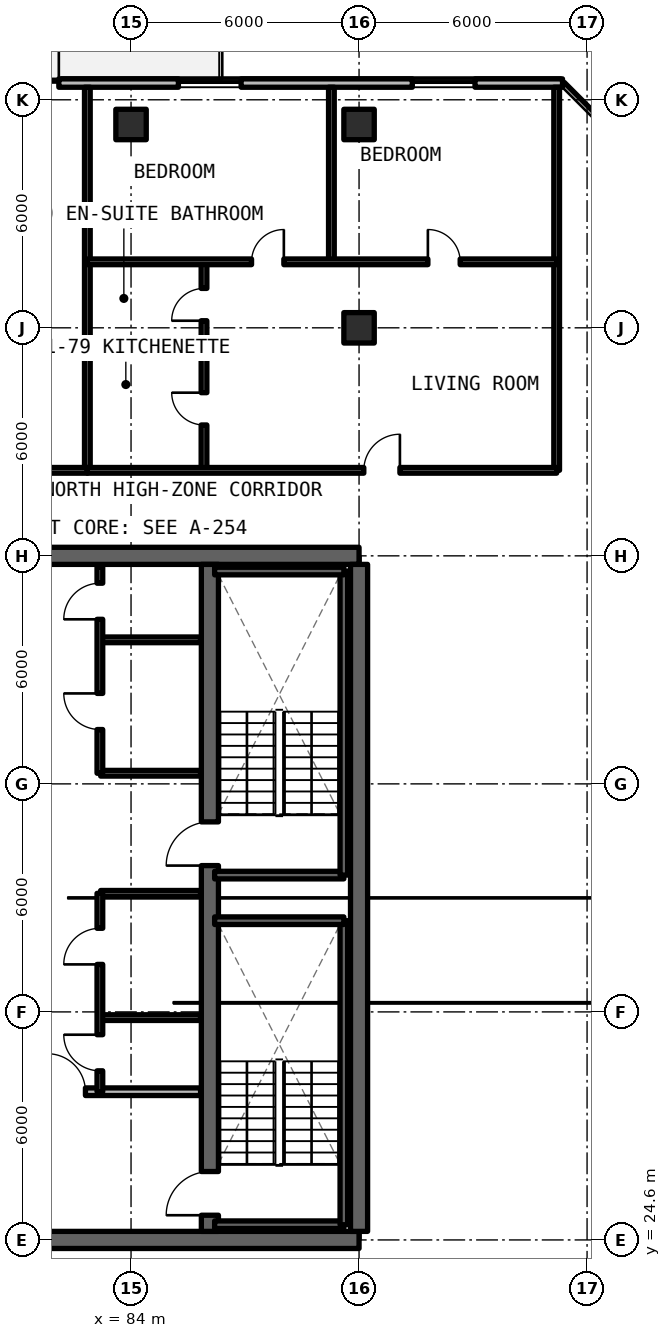
"""IFC4 building model, lengths in metres.
Left out: names, types, materials, properties, quantities, classifications, styles, units other than length and angle.
Written with IfcOpenShell. Run it as: python <this file> out.ifc"""

import sys

from ifc_helpers import new_model, si_unit, direction, frame, frame_2d, origin, origin_2d, place, context, subcontext, project, spatial, rectangle, extrude, element, fill, save


model = new_model("IFC4")
c1 = context("Model", 3, precision=1e-05, world=origin(), true_north=direction((0.0, 1.0)))
c2 = subcontext(c1, "Body", "Model", "MODEL_VIEW")
j1 = project(units=[si_unit("LENGTHUNIT", "METRE"), si_unit("PLANEANGLEUNIT", "RADIAN")], contexts=[c1])
p1 = place(None, origin())
s1 = spatial("IfcSite", under=j1, at=p1, CompositionType="ELEMENT")
p2 = place(p1, origin())
s2 = spatial("IfcBuilding", under=s1, at=p2, CompositionType="ELEMENT")
p3 = place(p2, frame((0.0, 0.0, 185.13)))
s3 = spatial("IfcBuildingStorey", under=s2, at=p3, CompositionType="ELEMENT", Elevation=185.13)
for number, where, z_axis, x_axis in (
    (1, (78.0, 24.6, 0.0), (0.0, 0.0, 1.0), (1.0, 0.0, 0.0)),
    (2, (90.0, 42.6, 0.0), (0.0, 0.0, 1.0), (-1.0, 0.0, 0.0)),
):
    element("IfcWall", number, at=place(p3, frame(where, z_axis=z_axis, x_axis=x_axis)), inside=s3, PredefinedType="SHEAR", context=c2, shape_type="SweptSolid", body=[
        extrude(rectangle(XDim=12.0, YDim=0.45, at=frame_2d((6.0, 0.0))), origin(), (0.0, 0.0, 1.0), 3.3),
    ])
p4 = place(p3, frame((90.0, 24.825, 0.0), z_axis=(0.0, 0.0, 1.0), x_axis=(0.0, 1.0, 0.0)))
e3 = element("IfcWall", 3, at=p4, inside=s3, PredefinedType="SHEAR", context=c2, shape_type="SweptSolid", body=[
    extrude(rectangle(XDim=17.55, YDim=0.45, at=frame_2d((8.775, 0.0))), origin(), (0.0, 0.0, 1.0), 3.3),
])
p5 = place(p3, frame((86.075, 24.825, 0.0), z_axis=(0.0, 0.0, 1.0), x_axis=(0.0, 1.0, 0.0)))
e4 = element("IfcWall", 4, at=p5, inside=s3, PredefinedType="SHEAR", context=c2, shape_type="SweptSolid", body=[
    extrude(rectangle(XDim=17.55, YDim=0.45, at=frame_2d((8.775, 0.0))), origin(), (0.0, 0.0, 1.0), 3.3),
])
p6 = place(p5, frame((0.425, 0.0, 0.0)))
e5 = element("IfcOpeningElement", 5, at=p6, cuts=e4, PredefinedType="OPENING", context=c2, shape_type="SweptSolid", body=[
    extrude(rectangle(XDim=1.15, YDim=2.15, at=frame_2d((0.575, 1.075))), frame((0.0, 0.235, 0.0), z_axis=(0.0, -1.0, 0.0), x_axis=(1.0, 0.0, 0.0)), (0.0, 0.0, 1.0), 0.47),
])
p7 = place(p5, frame((9.625, 0.0, 0.0)))
e6 = element("IfcOpeningElement", 6, at=p7, cuts=e4, PredefinedType="OPENING", context=c2, shape_type="SweptSolid", body=[
    extrude(rectangle(XDim=1.15, YDim=2.15, at=frame_2d((0.575, 1.075))), frame((0.0, 0.235, 0.0), z_axis=(0.0, -1.0, 0.0), x_axis=(1.0, 0.0, 0.0)), (0.0, 0.0, 1.0), 0.47),
])
for number, where, z_axis, x_axis in (
    (7, (90.0, 48.6, 0.0), (0.0, 0.0, 1.0), (1.0, 0.0, 0.0)),
    (8, (84.0, 53.95, 0.0), (0.0, 0.0, 1.0), (1.0, 0.0, 0.0)),
    (9, (90.0, 53.95, 0.0), (0.0, 0.0, 1.0), (1.0, 0.0, 0.0)),
):
    element("IfcColumn", number, at=place(p3, frame(where, z_axis=z_axis, x_axis=x_axis)), inside=s3, PredefinedType="COLUMN", context=c2, shape_type="SweptSolid", body=[
        extrude(rectangle(XDim=0.8, YDim=0.8, at=origin_2d()), origin(), (0.0, 0.0, 1.0), 3.3),
    ])
p8 = place(p3, frame((95.354, 55.04, 0.0), z_axis=(0.0, 0.0, 1.0), x_axis=(-1.0, 0.0, 0.0)))
e10 = element("IfcWall", 10, at=p8, inside=s3, PredefinedType="SOLIDWALL", context=c2, shape_type="SweptSolid", body=[
    extrude(rectangle(XDim=43.244, YDim=0.22, at=frame_2d((21.622, 0.0))), origin(), (0.0, 0.0, 1.0), 3.08),
])
p9 = place(p8, frame((37.204, 0.0, 0.0)))
e11 = element("IfcOpeningElement", 11, at=p9, cuts=e10, PredefinedType="OPENING", context=c2, shape_type="SweptSolid", body=[
    extrude(rectangle(XDim=1.1, YDim=2.15, at=frame_2d((0.55, 1.075))), frame((0.0, 0.12, 0.0), z_axis=(0.0, -1.0, 0.0), x_axis=(1.0, 0.0, 0.0)), (0.0, 0.0, 1.0), 0.24),
])
p10 = place(p8, frame((25.104, 0.0, 0.0)))
e12 = element("IfcOpeningElement", 12, at=p10, cuts=e10, PredefinedType="OPENING", context=c2, shape_type="SweptSolid", body=[
    extrude(rectangle(XDim=1.1, YDim=2.15, at=frame_2d((0.55, 1.075))), frame((0.0, 0.12, 0.0), z_axis=(0.0, -1.0, 0.0), x_axis=(1.0, 0.0, 0.0)), (0.0, 0.0, 1.0), 0.24),
])
p11 = place(p8, frame((13.254, 0.0, 0.0)))
e13 = element("IfcOpeningElement", 13, at=p11, cuts=e10, PredefinedType="OPENING", context=c2, shape_type="SweptSolid", body=[
    extrude(rectangle(XDim=1.1, YDim=2.15, at=frame_2d((0.55, 1.075))), frame((0.0, 0.12, 0.0), z_axis=(0.0, -1.0, 0.0), x_axis=(1.0, 0.0, 0.0)), (0.0, 0.0, 1.0), 0.24),
])
p12 = place(p8, frame((32.815, 0.0, 0.78)))
e14 = element("IfcOpeningElement", 14, at=p12, cuts=e10, PredefinedType="OPENING", context=c2, shape_type="SweptSolid", body=[
    extrude(rectangle(XDim=1.65, YDim=1.66, at=frame_2d((0.825, 0.83))), frame((0.0, 0.12, 0.0), z_axis=(0.0, -1.0, 0.0), x_axis=(1.0, 0.0, 0.0)), (0.0, 0.0, 1.0), 0.24),
])
p13 = place(p8, frame((8.458, 0.0, 0.78)))
e15 = element("IfcOpeningElement", 15, at=p13, cuts=e10, PredefinedType="OPENING", context=c2, shape_type="SweptSolid", body=[
    extrude(rectangle(XDim=1.65, YDim=1.66, at=frame_2d((0.825, 0.83))), frame((0.0, 0.12, 0.0), z_axis=(0.0, -1.0, 0.0), x_axis=(1.0, 0.0, 0.0)), (0.0, 0.0, 1.0), 0.24),
])
p14 = place(p8, frame((2.303, 0.0, 0.78)))
e16 = element("IfcOpeningElement", 16, at=p14, cuts=e10, PredefinedType="OPENING", context=c2, shape_type="SweptSolid", body=[
    extrude(rectangle(XDim=1.65, YDim=1.66, at=frame_2d((0.825, 0.83))), frame((0.0, 0.12, 0.0), z_axis=(0.0, -1.0, 0.0), x_axis=(1.0, 0.0, 0.0)), (0.0, 0.0, 1.0), 0.24),
])
p15 = place(p3, frame((78.245, 28.5, 0.0), z_axis=(0.0, 0.0, 1.0), x_axis=(1.0, 0.0, 0.0)))
e17 = element("IfcWall", 17, at=p15, inside=s3, PredefinedType="SOLIDWALL", context=c2, shape_type="SweptSolid", body=[
    extrude(rectangle(XDim=7.585, YDim=0.2, at=frame_2d((3.792, 0.0))), origin(), (0.0, 0.0, 1.0), 2.35),
])
p16 = place(p15, frame((3.555, 0.0, 0.0)))
e18 = element("IfcOpeningElement", 18, at=p16, cuts=e17, PredefinedType="OPENING", context=c2, shape_type="SweptSolid", body=[
    extrude(rectangle(XDim=1.0, YDim=2.15, at=frame_2d((0.5, 1.075))), frame((0.0, 0.11, 0.0), z_axis=(0.0, -1.0, 0.0), x_axis=(1.0, 0.0, 0.0)), (0.0, 0.0, 1.0), 0.22),
])
for number, where, z_axis, x_axis in (
    (19, (83.2, 30.45, 0.0), (0.0, 0.0, 1.0), (1.0, 0.0, 0.0)),
    (20, (83.2, 33.72, 0.0), (0.0, 0.0, 1.0), (1.0, 0.0, 0.0)),
):
    element("IfcWall", number, at=place(p3, frame(where, z_axis=z_axis, x_axis=x_axis)), inside=s3, PredefinedType="SOLIDWALL", context=c2, shape_type="SweptSolid", body=[
        extrude(rectangle(XDim=2.63, YDim=0.15, at=frame_2d((1.315, 0.0))), origin(), (0.0, 0.0, 1.0), 2.35),
    ])
p17 = place(p3, frame((83.18, 28.5, 0.0), z_axis=(0.0, 0.0, 1.0), x_axis=(0.0, 1.0, 0.0)))
e21 = element("IfcWall", 21, at=p17, inside=s3, PredefinedType="SOLIDWALL", context=c2, shape_type="SweptSolid", body=[
    extrude(rectangle(XDim=5.22, YDim=0.15, at=frame_2d((2.61, 0.0))), origin(), (0.0, 0.0, 1.0), 2.35),
])
p18 = place(p17, frame((0.55, 0.0, 0.0)))
e22 = element("IfcOpeningElement", 22, at=p18, cuts=e21, PredefinedType="OPENING", context=c2, shape_type="SweptSolid", body=[
    extrude(rectangle(XDim=0.95, YDim=2.15, at=frame_2d((0.475, 1.075))), frame((0.0, 0.085, 0.0), z_axis=(0.0, -1.0, 0.0), x_axis=(1.0, 0.0, 0.0)), (0.0, 0.0, 1.0), 0.17),
])
p19 = place(p17, frame((3.35, 0.0, 0.0)))
e23 = element("IfcOpeningElement", 23, at=p19, cuts=e21, PredefinedType="OPENING", context=c2, shape_type="SweptSolid", body=[
    extrude(rectangle(XDim=0.95, YDim=2.15, at=frame_2d((0.475, 1.075))), frame((0.0, 0.085, 0.0), z_axis=(0.0, -1.0, 0.0), x_axis=(1.0, 0.0, 0.0)), (0.0, 0.0, 1.0), 0.17),
])
for number, where, z_axis, x_axis in (
    (24, (83.2, 36.88, 0.0), (0.0, 0.0, 1.0), (1.0, 0.0, 0.0)),
    (25, (83.2, 40.39, 0.0), (0.0, 0.0, 1.0), (1.0, 0.0, 0.0)),
):
    element("IfcWall", number, at=place(p3, frame(where, z_axis=z_axis, x_axis=x_axis)), inside=s3, PredefinedType="SOLIDWALL", context=c2, shape_type="SweptSolid", body=[
        extrude(rectangle(XDim=2.63, YDim=0.15, at=frame_2d((1.315, 0.0))), origin(), (0.0, 0.0, 1.0), 2.35),
    ])
p20 = place(p3, frame((83.18, 36.88, 0.0), z_axis=(0.0, 0.0, 1.0), x_axis=(0.0, 1.0, 0.0)))
e26 = element("IfcWall", 26, at=p20, inside=s3, PredefinedType="SOLIDWALL", context=c2, shape_type="SweptSolid", body=[
    extrude(rectangle(XDim=5.42, YDim=0.15, at=frame_2d((2.71, 0.0))), origin(), (0.0, 0.0, 1.0), 2.35),
])
p21 = place(p20, frame((1.15, 0.0, 0.0)))
e27 = element("IfcOpeningElement", 27, at=p21, cuts=e26, PredefinedType="OPENING", context=c2, shape_type="SweptSolid", body=[
    extrude(rectangle(XDim=0.95, YDim=2.15, at=frame_2d((0.475, 1.075))), frame((0.0, 0.085, 0.0), z_axis=(0.0, -1.0, 0.0), x_axis=(1.0, 0.0, 0.0)), (0.0, 0.0, 1.0), 0.17),
])
p22 = place(p20, frame((4.05, 0.0, 0.0)))
e28 = element("IfcOpeningElement", 28, at=p22, cuts=e26, PredefinedType="OPENING", context=c2, shape_type="SweptSolid", body=[
    extrude(rectangle(XDim=0.95, YDim=2.15, at=frame_2d((0.475, 1.075))), frame((0.0, 0.085, 0.0), z_axis=(0.0, -1.0, 0.0), x_axis=(1.0, 0.0, 0.0)), (0.0, 0.0, 1.0), 0.17),
])
for number, where, z_axis, x_axis in (
    (29, (95.2, 44.85, 0.0), (0.0, 0.0, 1.0), (0.0, 1.0, 0.0)),
    (30, (82.85, 44.85, 0.0), (0.0, 0.0, 1.0), (0.0, 1.0, 0.0)),
):
    element("IfcWall", number, at=place(p3, frame(where, z_axis=z_axis, x_axis=x_axis)), inside=s3, PredefinedType="SOLIDWALL", context=c2, shape_type="SweptSolid", body=[
        extrude(rectangle(XDim=10.08, YDim=0.15, at=frame_2d((5.04, 0.0))), origin(), (0.0, 0.0, 1.0), 2.35),
    ])
p23 = place(p3, frame((73.086, 44.85, 0.0), z_axis=(0.0, 0.0, 1.0), x_axis=(1.0, 0.0, 0.0)))
e31 = element("IfcWall", 31, at=p23, inside=s3, PredefinedType="SOLIDWALL", context=c2, shape_type="SweptSolid", body=[
    extrude(rectangle(XDim=9.765, YDim=0.15, at=frame_2d((4.882, 0.0))), origin(), (0.0, 0.0, 1.0), 2.35),
])
p24 = place(p23, frame((4.333, 0.0, 0.0)))
e32 = element("IfcOpeningElement", 32, at=p24, cuts=e31, PredefinedType="OPENING", context=c2, shape_type="SweptSolid", body=[
    extrude(rectangle(XDim=1.1, YDim=2.15, at=frame_2d((0.55, 1.075))), frame((0.0, 0.085, 0.0), z_axis=(0.0, -1.0, 0.0), x_axis=(1.0, 0.0, 0.0)), (0.0, 0.0, 1.0), 0.17),
])
p25 = place(p3, frame((82.85, 48.087, 0.0), z_axis=(0.0, 0.0, 1.0), x_axis=(1.0, 0.0, 0.0)))
e33 = element("IfcWall", 33, at=p25, inside=s3, PredefinedType="PARTITIONING", context=c2, shape_type="SweptSolid", body=[
    extrude(rectangle(XDim=3.07, YDim=0.15, at=frame_2d((1.535, 0.0))), origin(), (0.0, 0.0, 1.0), 2.35),
])
p26 = place(p3, frame((85.92, 44.85, 0.0), z_axis=(0.0, 0.0, 1.0), x_axis=(0.0, 1.0, 0.0)))
e34 = element("IfcWall", 34, at=p26, inside=s3, PredefinedType="PARTITIONING", context=c2, shape_type="SweptSolid", body=[
    extrude(rectangle(XDim=5.486, YDim=0.15, at=frame_2d((2.743, 0.0))), origin(), (0.0, 0.0, 1.0), 2.35),
])
p27 = place(p26, frame((1.193, 0.0, 0.0)))
e35 = element("IfcOpeningElement", 35, at=p27, cuts=e34, PredefinedType="OPENING", context=c2, shape_type="SweptSolid", body=[
    extrude(rectangle(XDim=0.85, YDim=2.1, at=frame_2d((0.425, 1.05))), frame((0.0, 0.085, 0.0), z_axis=(0.0, -1.0, 0.0), x_axis=(1.0, 0.0, 0.0)), (0.0, 0.0, 1.0), 0.17),
])
p28 = place(p26, frame((3.937, 0.0, 0.0)))
e36 = element("IfcOpeningElement", 36, at=p28, cuts=e34, PredefinedType="OPENING", context=c2, shape_type="SweptSolid", body=[
    extrude(rectangle(XDim=0.85, YDim=2.1, at=frame_2d((0.425, 1.05))), frame((0.0, 0.085, 0.0), z_axis=(0.0, -1.0, 0.0), x_axis=(1.0, 0.0, 0.0)), (0.0, 0.0, 1.0), 0.17),
])
p29 = place(p3, frame((89.272, 50.336, 0.0), z_axis=(0.0, 0.0, 1.0), x_axis=(0.0, 1.0, 0.0)))
e37 = element("IfcWall", 37, at=p29, inside=s3, PredefinedType="PARTITIONING", context=c2, shape_type="SweptSolid", body=[
    extrude(rectangle(XDim=4.594, YDim=0.15, at=frame_2d((2.297, 0.0))), origin(), (0.0, 0.0, 1.0), 2.35),
])
p30 = place(p3, frame((82.85, 50.336, 0.0), z_axis=(0.0, 0.0, 1.0), x_axis=(1.0, 0.0, 0.0)))
e38 = element("IfcWall", 38, at=p30, inside=s3, PredefinedType="PARTITIONING", context=c2, shape_type="SweptSolid", body=[
    extrude(rectangle(XDim=12.35, YDim=0.15, at=frame_2d((6.175, 0.0))), origin(), (0.0, 0.0, 1.0), 2.35),
])
p31 = place(p30, frame((4.321, 0.0, 0.0)))
e39 = element("IfcOpeningElement", 39, at=p31, cuts=e38, PredefinedType="OPENING", context=c2, shape_type="SweptSolid", body=[
    extrude(rectangle(XDim=0.85, YDim=2.1, at=frame_2d((0.425, 1.05))), frame((0.0, 0.085, 0.0), z_axis=(0.0, -1.0, 0.0), x_axis=(1.0, 0.0, 0.0)), (0.0, 0.0, 1.0), 0.17),
])
p32 = place(p30, frame((8.961, 0.0, 0.0)))
e40 = element("IfcOpeningElement", 40, at=p32, cuts=e38, PredefinedType="OPENING", context=c2, shape_type="SweptSolid", body=[
    extrude(rectangle(XDim=0.85, YDim=2.1, at=frame_2d((0.425, 1.05))), frame((0.0, 0.085, 0.0), z_axis=(0.0, -1.0, 0.0), x_axis=(1.0, 0.0, 0.0)), (0.0, 0.0, 1.0), 0.17),
])
p33 = place(p3, frame((82.85, 44.85, 0.0), z_axis=(0.0, 0.0, 1.0), x_axis=(1.0, 0.0, 0.0)))
e41 = element("IfcWall", 41, at=p33, inside=s3, PredefinedType="SOLIDWALL", context=c2, shape_type="SweptSolid", body=[
    extrude(rectangle(XDim=12.35, YDim=0.15, at=frame_2d((6.175, 0.0))), origin(), (0.0, 0.0, 1.0), 2.35),
])
p34 = place(p33, frame((7.275, 0.0, 0.0)))
e42 = element("IfcOpeningElement", 42, at=p34, cuts=e41, PredefinedType="OPENING", context=c2, shape_type="SweptSolid", body=[
    extrude(rectangle(XDim=0.95, YDim=2.15, at=frame_2d((0.475, 1.075))), frame((0.0, 0.085, 0.0), z_axis=(0.0, -1.0, 0.0), x_axis=(1.0, 0.0, 0.0)), (0.0, 0.0, 1.0), 0.17),
])
p35 = place(p3, frame((86.2, 25.0, 0.0), z_axis=(0.0, 0.0, 1.0), x_axis=(1.0, 0.0, 0.0)))
e43 = element("IfcWall", 43, at=p35, inside=s3, PredefinedType="SOLIDWALL", context=c2, shape_type="SweptSolid", body=[
    extrude(rectangle(XDim=3.4, YDim=0.2, at=frame_2d((1.7, 0.0))), origin(), (0.0, 0.0, 1.0), 3.3),
])
p36 = place(p3, frame((89.6, 25.0, 0.0), z_axis=(0.0, 0.0, 1.0), x_axis=(0.0, 1.0, 0.0)))
e44 = element("IfcWall", 44, at=p36, inside=s3, PredefinedType="SOLIDWALL", context=c2, shape_type="SweptSolid", body=[
    extrude(rectangle(XDim=8.0, YDim=0.2, at=frame_2d((4.0, 0.0))), origin(), (0.0, 0.0, 1.0), 3.3),
])
for number, where, z_axis, x_axis in (
    (45, (89.6, 33.0, 0.0), (0.0, 0.0, 1.0), (-1.0, 0.0, 0.0)),
    (46, (86.2, 34.2, 0.0), (0.0, 0.0, 1.0), (1.0, 0.0, 0.0)),
):
    element("IfcWall", number, at=place(p3, frame(where, z_axis=z_axis, x_axis=x_axis)), inside=s3, PredefinedType="SOLIDWALL", context=c2, shape_type="SweptSolid", body=[
        extrude(rectangle(XDim=3.4, YDim=0.2, at=frame_2d((1.7, 0.0))), origin(), (0.0, 0.0, 1.0), 3.3),
    ])
p37 = place(p3, frame((89.6, 34.2, 0.0), z_axis=(0.0, 0.0, 1.0), x_axis=(0.0, 1.0, 0.0)))
e47 = element("IfcWall", 47, at=p37, inside=s3, PredefinedType="SOLIDWALL", context=c2, shape_type="SweptSolid", body=[
    extrude(rectangle(XDim=8.0, YDim=0.2, at=frame_2d((4.0, 0.0))), origin(), (0.0, 0.0, 1.0), 3.3),
])
p38 = place(p3, frame((89.6, 42.2, 0.0), z_axis=(0.0, 0.0, 1.0), x_axis=(-1.0, 0.0, 0.0)))
e48 = element("IfcWall", 48, at=p38, inside=s3, PredefinedType="SOLIDWALL", context=c2, shape_type="SweptSolid", body=[
    extrude(rectangle(XDim=3.4, YDim=0.2, at=frame_2d((1.7, 0.0))), origin(), (0.0, 0.0, 1.0), 3.3),
])
p39 = place(p11, frame((1.1, 0.0, 0.0), z_axis=(0.0, 0.0, 1.0), x_axis=(-1.0, 0.0, 0.0)))
e49 = element("IfcDoor", 49, at=p39, inside=s3, OperationType="SINGLE_SWING_RIGHT", PredefinedType="DOOR", context=c2, shape_type="SweptSolid", body=[
    extrude(rectangle(XDim=1.1, YDim=2.15, at=frame_2d((0.55, 1.075))), frame((0.0, 0.025, 0.0), z_axis=(0.0, -1.0, 0.0), x_axis=(1.0, 0.0, 0.0)), (0.0, 0.0, 1.0), 0.05),
])
fill(e13, e49)
p40 = place(p13, origin())
e50 = element("IfcWindow", 50, at=p40, inside=s3, PartitioningType="SINGLE_PANEL", PredefinedType="WINDOW", context=c2, shape_type="SweptSolid", body=[
    extrude(rectangle(XDim=1.65, YDim=1.66, at=frame_2d((0.825, 0.83))), frame((0.0, 0.03, 0.0), z_axis=(0.0, -1.0, 0.0), x_axis=(1.0, 0.0, 0.0)), (0.0, 0.0, 1.0), 0.06),
])
fill(e15, e50)
p41 = place(p14, origin())
e51 = element("IfcWindow", 51, at=p41, inside=s3, PartitioningType="SINGLE_PANEL", PredefinedType="WINDOW", context=c2, shape_type="SweptSolid", body=[
    extrude(rectangle(XDim=1.65, YDim=1.66, at=frame_2d((0.825, 0.83))), frame((0.0, 0.03, 0.0), z_axis=(0.0, -1.0, 0.0), x_axis=(1.0, 0.0, 0.0)), (0.0, 0.0, 1.0), 0.06),
])
fill(e16, e51)
p42 = place(p16, origin())
e52 = element("IfcDoor", 52, at=p42, inside=s3, OperationType="SINGLE_SWING_LEFT", PredefinedType="DOOR", context=c2, shape_type="SweptSolid", body=[
    extrude(rectangle(XDim=1.0, YDim=2.15, at=frame_2d((0.5, 1.075))), frame((0.0, 0.025, 0.0), z_axis=(0.0, -1.0, 0.0), x_axis=(1.0, 0.0, 0.0)), (0.0, 0.0, 1.0), 0.05),
])
fill(e18, e52)
p43 = place(p18, origin())
e53 = element("IfcDoor", 53, at=p43, inside=s3, OperationType="SINGLE_SWING_RIGHT", PredefinedType="DOOR", context=c2, shape_type="SweptSolid", body=[
    extrude(rectangle(XDim=0.95, YDim=2.15, at=frame_2d((0.475, 1.075))), frame((0.0, 0.025, 0.0), z_axis=(0.0, -1.0, 0.0), x_axis=(1.0, 0.0, 0.0)), (0.0, 0.0, 1.0), 0.05),
])
fill(e22, e53)
p44 = place(p19, origin())
e54 = element("IfcDoor", 54, at=p44, inside=s3, OperationType="SINGLE_SWING_LEFT", PredefinedType="DOOR", context=c2, shape_type="SweptSolid", body=[
    extrude(rectangle(XDim=0.95, YDim=2.15, at=frame_2d((0.475, 1.075))), frame((0.0, 0.025, 0.0), z_axis=(0.0, -1.0, 0.0), x_axis=(1.0, 0.0, 0.0)), (0.0, 0.0, 1.0), 0.05),
])
fill(e23, e54)
p45 = place(p21, origin())
e55 = element("IfcDoor", 55, at=p45, inside=s3, OperationType="SINGLE_SWING_RIGHT", PredefinedType="DOOR", context=c2, shape_type="SweptSolid", body=[
    extrude(rectangle(XDim=0.95, YDim=2.15, at=frame_2d((0.475, 1.075))), frame((0.0, 0.025, 0.0), z_axis=(0.0, -1.0, 0.0), x_axis=(1.0, 0.0, 0.0)), (0.0, 0.0, 1.0), 0.05),
])
fill(e27, e55)
p46 = place(p22, origin())
e56 = element("IfcDoor", 56, at=p46, inside=s3, OperationType="SINGLE_SWING_LEFT", PredefinedType="DOOR", context=c2, shape_type="SweptSolid", body=[
    extrude(rectangle(XDim=0.95, YDim=2.15, at=frame_2d((0.475, 1.075))), frame((0.0, 0.025, 0.0), z_axis=(0.0, -1.0, 0.0), x_axis=(1.0, 0.0, 0.0)), (0.0, 0.0, 1.0), 0.05),
])
fill(e28, e56)
p47 = place(p27, origin())
e57 = element("IfcDoor", 57, at=p47, inside=s3, OperationType="SINGLE_SWING_RIGHT", PredefinedType="DOOR", context=c2, shape_type="SweptSolid", body=[
    extrude(rectangle(XDim=0.85, YDim=2.1, at=frame_2d((0.425, 1.05))), frame((0.0, 0.025, 0.0), z_axis=(0.0, -1.0, 0.0), x_axis=(1.0, 0.0, 0.0)), (0.0, 0.0, 1.0), 0.05),
])
fill(e35, e57)
p48 = place(p28, origin())
e58 = element("IfcDoor", 58, at=p48, inside=s3, OperationType="SINGLE_SWING_LEFT", PredefinedType="DOOR", context=c2, shape_type="SweptSolid", body=[
    extrude(rectangle(XDim=0.85, YDim=2.1, at=frame_2d((0.425, 1.05))), frame((0.0, 0.025, 0.0), z_axis=(0.0, -1.0, 0.0), x_axis=(1.0, 0.0, 0.0)), (0.0, 0.0, 1.0), 0.05),
])
fill(e36, e58)
p49 = place(p31, origin())
e59 = element("IfcDoor", 59, at=p49, inside=s3, OperationType="SINGLE_SWING_RIGHT", PredefinedType="DOOR", context=c2, shape_type="SweptSolid", body=[
    extrude(rectangle(XDim=0.85, YDim=2.1, at=frame_2d((0.425, 1.05))), frame((0.0, 0.025, 0.0), z_axis=(0.0, -1.0, 0.0), x_axis=(1.0, 0.0, 0.0)), (0.0, 0.0, 1.0), 0.05),
])
fill(e39, e59)
p50 = place(p32, origin())
e60 = element("IfcDoor", 60, at=p50, inside=s3, OperationType="SINGLE_SWING_LEFT", PredefinedType="DOOR", context=c2, shape_type="SweptSolid", body=[
    extrude(rectangle(XDim=0.85, YDim=2.1, at=frame_2d((0.425, 1.05))), frame((0.0, 0.025, 0.0), z_axis=(0.0, -1.0, 0.0), x_axis=(1.0, 0.0, 0.0)), (0.0, 0.0, 1.0), 0.05),
])
fill(e40, e60)
p51 = place(p34, origin())
e61 = element("IfcDoor", 61, at=p51, inside=s3, OperationType="SINGLE_SWING_RIGHT", PredefinedType="DOOR", context=c2, shape_type="SweptSolid", body=[
    extrude(rectangle(XDim=0.95, YDim=2.15, at=frame_2d((0.475, 1.075))), frame((0.0, 0.025, 0.0), z_axis=(0.0, -1.0, 0.0), x_axis=(1.0, 0.0, 0.0)), (0.0, 0.0, 1.0), 0.05),
])
fill(e42, e61)
p52 = place(p6, origin())
e62 = element("IfcDoor", 62, at=p52, inside=s3, OperationType="SINGLE_SWING_LEFT", PredefinedType="DOOR", context=c2, shape_type="SweptSolid", body=[
    extrude(rectangle(XDim=1.15, YDim=2.15, at=frame_2d((0.575, 1.075))), frame((0.0, 0.025, 0.0), z_axis=(0.0, -1.0, 0.0), x_axis=(1.0, 0.0, 0.0)), (0.0, 0.0, 1.0), 0.05),
])
fill(e5, e62)
p53 = place(p7, origin())
e63 = element("IfcDoor", 63, at=p53, inside=s3, OperationType="SINGLE_SWING_RIGHT", PredefinedType="DOOR", context=c2, shape_type="SweptSolid", body=[
    extrude(rectangle(XDim=1.15, YDim=2.15, at=frame_2d((0.575, 1.075))), frame((0.0, 0.025, 0.0), z_axis=(0.0, -1.0, 0.0), x_axis=(1.0, 0.0, 0.0)), (0.0, 0.0, 1.0), 0.05),
])
fill(e6, e63)
save(model, sys.argv[1])
